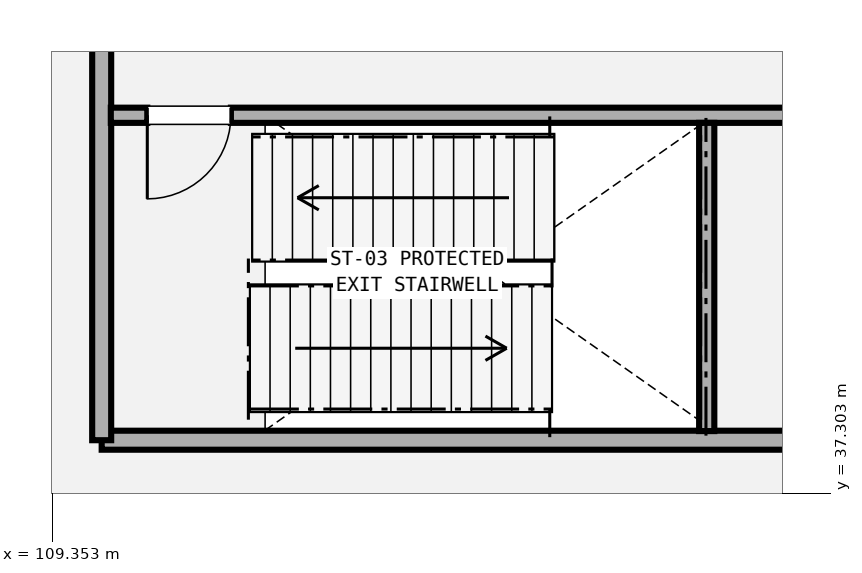
"""IFC4 building model, lengths in metres.
Left out: names, types, materials, properties, quantities, classifications, styles, units other than length and angle.
Written with IfcOpenShell. Run it as: python <this file> out.ifc"""

import sys

from ifc_helpers import new_model, si_unit, direction, frame, frame_2d, origin, place, context, subcontext, project, spatial, rectangle, extrude, element, fill, save


model = new_model("IFC4")
c1 = context("Model", 3, precision=1e-05, world=origin(), true_north=direction((0.0, 1.0)))
c2 = subcontext(c1, "Body", "Model", "MODEL_VIEW")
j1 = project(units=[si_unit("LENGTHUNIT", "METRE"), si_unit("PLANEANGLEUNIT", "RADIAN")], contexts=[c1])
p1 = place(None, origin())
s1 = spatial("IfcSite", under=j1, at=p1, CompositionType="ELEMENT")
p2 = place(p1, origin())
s2 = spatial("IfcBuilding", under=s1, at=p2, CompositionType="ELEMENT")
p3 = place(p2, origin())
s3 = spatial("IfcBuildingStorey", under=s2, at=p3, CompositionType="ELEMENT", Elevation=0.0)
p4 = place(p3, frame((110.0, 38.0, 0.0), z_axis=(0.0, 0.0, 1.0), x_axis=(1.0, 0.0, 0.0)))
e1 = element("IfcWall", 1, at=p4, inside=s3, PredefinedType="SHEAR", context=c2, shape_type="SweptSolid", body=[
    extrude(rectangle(XDim=10.8, YDim=0.25, at=frame_2d((5.4, 0.0))), origin(), (0.0, 0.0, 1.0), 5.08),
])
p5 = place(p3, frame((110.0, 38.0, 0.0), z_axis=(0.0, 0.0, 1.0), x_axis=(0.0, 1.0, 0.0)))
e2 = element("IfcWall", 2, at=p5, inside=s3, PredefinedType="SHEAR", context=c2, shape_type="SweptSolid", body=[
    extrude(rectangle(XDim=8.6, YDim=0.25, at=frame_2d((4.3, 0.0))), origin(), (0.0, 0.0, 1.0), 5.08),
])
p6 = place(p3, frame((110.12, 42.275, 0.0), z_axis=(0.0, 0.0, 1.0), x_axis=(1.0, 0.0, 0.0)))
e3 = element("IfcWall", 3, at=p6, inside=s3, PredefinedType="SHEAR", context=c2, shape_type="SweptSolid", body=[
    extrude(rectangle(XDim=10.56, YDim=0.2, at=frame_2d((5.28, 0.0))), origin(), (0.0, 0.0, 1.0), 5.08),
])
p7 = place(p6, frame((0.48, 0.0, 0.0)))
e4 = element("IfcOpeningElement", 4, at=p7, cuts=e3, PredefinedType="OPENING", context=c2, shape_type="SweptSolid", body=[
    extrude(rectangle(XDim=1.1, YDim=2.2, at=frame_2d((0.55, 1.1))), frame((0.0, 0.11, 0.0), z_axis=(0.0, -1.0, 0.0), x_axis=(1.0, 0.0, 0.0)), (0.0, 0.0, 1.0), 0.22),
])
p8 = place(p3, frame((117.96, 38.12, 0.0), z_axis=(0.0, 0.0, 1.0), x_axis=(0.0, 1.0, 0.0)))
e5 = element("IfcWall", 5, at=p8, inside=s3, PredefinedType="SHEAR", context=c2, shape_type="SweptSolid", body=[
    extrude(rectangle(XDim=4.055, YDim=0.2, at=frame_2d((2.027, 0.0))), origin(), (0.0, 0.0, 1.0), 5.08),
])
p9 = place(p7, frame((1.1, 0.0, 0.0), z_axis=(0.0, 0.0, 1.0), x_axis=(-1.0, 0.0, 0.0)))
e6 = element("IfcDoor", 6, at=p9, inside=s3, OperationType="SINGLE_SWING_RIGHT", PredefinedType="DOOR", context=c2, shape_type="SweptSolid", body=[
    extrude(rectangle(XDim=1.1, YDim=2.2, at=frame_2d((0.55, 1.1))), frame((0.0, 0.025, 0.0), z_axis=(0.0, -1.0, 0.0), x_axis=(1.0, 0.0, 0.0)), (0.0, 0.0, 1.0), 0.05),
])
fill(e4, e6)
save(model, sys.argv[1])
